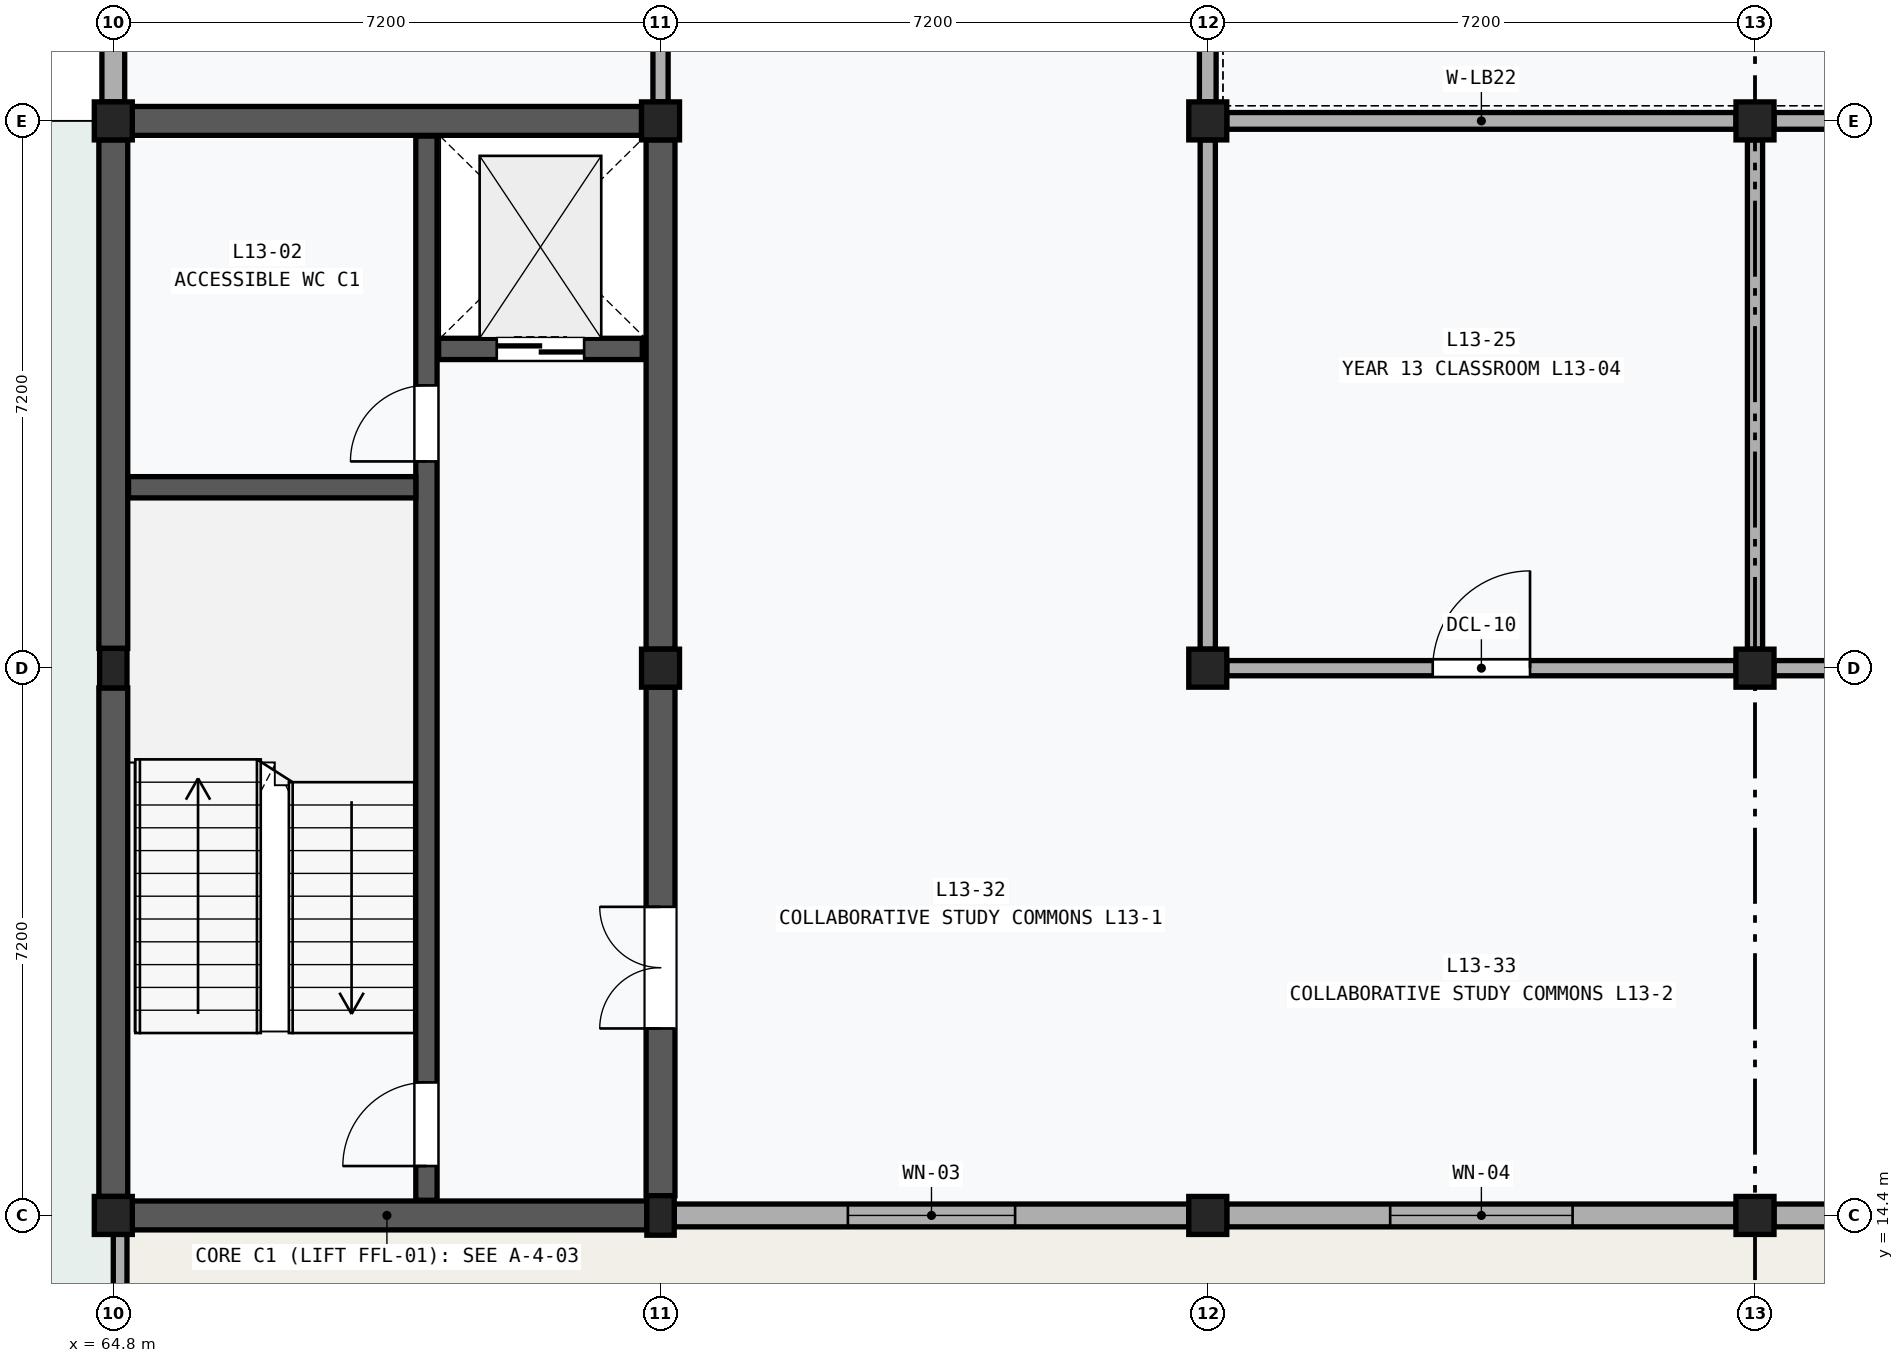
"""IFC4 building model, lengths in metres.
Left out: names, types, materials, properties, quantities, classifications, styles, units other than length and angle.
Written with IfcOpenShell. Run it as: python <this file> out.ifc"""

import sys

from ifc_helpers import new_model, si_unit, direction, frame, frame_2d, origin, origin_2d, place, context, subcontext, project, spatial, rectangle, extrude, element, fill, save


model = new_model("IFC4")
c1 = context("Model", 3, precision=1e-05, world=origin(), true_north=direction((0.0, 1.0)))
c2 = subcontext(c1, "Body", "Model", "MODEL_VIEW")
j1 = project(units=[si_unit("LENGTHUNIT", "METRE"), si_unit("PLANEANGLEUNIT", "RADIAN")], contexts=[c1])
p1 = place(None, origin())
s1 = spatial("IfcSite", under=j1, at=p1, CompositionType="ELEMENT")
p2 = place(p1, origin())
s2 = spatial("IfcBuilding", under=s1, at=p2, CompositionType="ELEMENT")
p3 = place(p2, frame((0.0, 0.0, 55.0)))
s3 = spatial("IfcBuildingStorey", under=s2, at=p3, CompositionType="ELEMENT", Elevation=55.0)
p4 = place(p3, frame((64.8, 14.4, 0.0), z_axis=(0.0, 0.0, 1.0), x_axis=(1.0, 0.0, 0.0)))
e1 = element("IfcColumn", 1, at=p4, inside=s3, PredefinedType="COLUMN", context=c2, shape_type="SweptSolid", body=[
    extrude(rectangle(XDim=0.5, YDim=0.5, at=origin_2d()), origin(), (0.0, 0.0, 1.0), 4.0),
])
p5 = place(p3, frame((64.8, 21.6, 0.0), z_axis=(0.0, 0.0, 1.0), x_axis=(1.0, 0.0, 0.0)))
e2 = element("IfcColumn", 2, at=p5, inside=s3, PredefinedType="PILASTER", context=c2, shape_type="SweptSolid", body=[
    extrude(rectangle(XDim=0.36, YDim=0.52, at=origin_2d()), origin(), (0.0, 0.0, 1.0), 4.0),
])
p6 = place(p3, frame((64.8, 28.8, 0.0), z_axis=(0.0, 0.0, 1.0), x_axis=(1.0, 0.0, 0.0)))
e3 = element("IfcColumn", 3, at=p6, inside=s3, PredefinedType="COLUMN", context=c2, shape_type="SweptSolid", body=[
    extrude(rectangle(XDim=0.5, YDim=0.5, at=origin_2d()), origin(), (0.0, 0.0, 1.0), 4.0),
])
p7 = place(p3, frame((72.0, 14.4, 0.0), z_axis=(0.0, 0.0, 1.0), x_axis=(1.0, 0.0, 0.0)))
e4 = element("IfcColumn", 4, at=p7, inside=s3, PredefinedType="PILASTER", context=c2, shape_type="SweptSolid", body=[
    extrude(rectangle(XDim=0.36, YDim=0.52, at=origin_2d()), origin(), (0.0, 0.0, 1.0), 4.0),
])
for number, where, z_axis, x_axis in (
    (5, (72.0, 21.6, 0.0), (0.0, 0.0, 1.0), (1.0, 0.0, 0.0)),
    (6, (72.0, 28.8, 0.0), (0.0, 0.0, 1.0), (1.0, 0.0, 0.0)),
    (7, (79.2, 14.4, 0.0), (0.0, 0.0, 1.0), (1.0, 0.0, 0.0)),
    (8, (79.2, 21.6, 0.0), (0.0, 0.0, 1.0), (1.0, 0.0, 0.0)),
    (9, (79.2, 28.8, 0.0), (0.0, 0.0, 1.0), (1.0, 0.0, 0.0)),
    (10, (86.4, 14.4, 0.0), (0.0, 0.0, 1.0), (1.0, 0.0, 0.0)),
    (11, (86.4, 21.6, 0.0), (0.0, 0.0, 1.0), (1.0, 0.0, 0.0)),
    (12, (86.4, 28.8, 0.0), (0.0, 0.0, 1.0), (1.0, 0.0, 0.0)),
):
    element("IfcColumn", number, at=place(p3, frame(where, z_axis=z_axis, x_axis=x_axis)), inside=s3, PredefinedType="COLUMN", context=c2, shape_type="SweptSolid", body=[
        extrude(rectangle(XDim=0.5, YDim=0.5, at=origin_2d()), origin(), (0.0, 0.0, 1.0), 4.0),
    ])
p8 = place(p3, frame((64.8, 29.05, 0.0), z_axis=(0.0, 0.0, 1.0), x_axis=(0.0, 1.0, 0.0)))
e13 = element("IfcWall", 13, at=p8, inside=s3, PredefinedType="SOLIDWALL", context=c2, shape_type="SweptSolid", body=[
    extrude(rectangle(XDim=6.7, YDim=0.3, at=frame_2d((3.35, 0.0))), origin(), (0.0, 0.0, 1.0), 3.17),
])
p9 = place(p3, frame((72.18, 14.4, 0.0), z_axis=(0.0, 0.0, 1.0), x_axis=(1.0, 0.0, 0.0)))
e14 = element("IfcWall", 14, at=p9, inside=s3, PredefinedType="SOLIDWALL", context=c2, shape_type="SweptSolid", body=[
    extrude(rectangle(XDim=6.77, YDim=0.3, at=frame_2d((3.385, 0.0))), origin(), (0.0, 0.0, 1.0), 3.17),
])
p10 = place(p9, frame((2.285, 0.0, 0.9)))
e15 = element("IfcOpeningElement", 15, at=p10, cuts=e14, PredefinedType="OPENING", context=c2, shape_type="SweptSolid", body=[
    extrude(rectangle(XDim=2.2, YDim=1.8, at=frame_2d((1.1, 0.9))), frame((0.0, 0.162, 0.0), z_axis=(0.0, -1.0, 0.0), x_axis=(1.0, 0.0, 0.0)), (0.0, 0.0, 1.0), 0.324),
])
p11 = place(p3, frame((79.45, 14.4, 0.0), z_axis=(0.0, 0.0, 1.0), x_axis=(1.0, 0.0, 0.0)))
e16 = element("IfcWall", 16, at=p11, inside=s3, PredefinedType="SOLIDWALL", context=c2, shape_type="SweptSolid", body=[
    extrude(rectangle(XDim=6.7, YDim=0.3, at=frame_2d((3.35, 0.0))), origin(), (0.0, 0.0, 1.0), 3.17),
])
p12 = place(p11, frame((2.15, 0.0, 0.9)))
e17 = element("IfcOpeningElement", 17, at=p12, cuts=e16, PredefinedType="OPENING", context=c2, shape_type="SweptSolid", body=[
    extrude(rectangle(XDim=2.4, YDim=1.8, at=frame_2d((1.2, 0.9))), frame((0.0, 0.162, 0.0), z_axis=(0.0, -1.0, 0.0), x_axis=(1.0, 0.0, 0.0)), (0.0, 0.0, 1.0), 0.324),
])
p13 = place(p3, frame((86.65, 14.4, 0.0), z_axis=(0.0, 0.0, 1.0), x_axis=(1.0, 0.0, 0.0)))
e18 = element("IfcWall", 18, at=p13, inside=s3, PredefinedType="SOLIDWALL", context=c2, shape_type="SweptSolid", body=[
    extrude(rectangle(XDim=6.7, YDim=0.3, at=frame_2d((3.35, 0.0))), origin(), (0.0, 0.0, 1.0), 3.17),
])
p14 = place(p13, frame((2.05, 0.0, 0.9)))
e19 = element("IfcOpeningElement", 19, at=p14, cuts=e18, PredefinedType="OPENING", context=c2, shape_type="SweptSolid", body=[
    extrude(rectangle(XDim=2.6, YDim=1.8, at=frame_2d((1.3, 0.9))), frame((0.0, 0.162, 0.0), z_axis=(0.0, -1.0, 0.0), x_axis=(1.0, 0.0, 0.0)), (0.0, 0.0, 1.0), 0.324),
])
p15 = place(p3, frame((64.89, 7.29, 0.0), z_axis=(0.0, 0.0, 1.0), x_axis=(0.0, 1.0, 0.0)))
e20 = element("IfcWall", 20, at=p15, inside=s3, PredefinedType="PARAPET", context=c2, shape_type="SweptSolid", body=[
    extrude(rectangle(XDim=7.02, YDim=0.18, at=frame_2d((3.51, 0.0))), origin(), (0.0, 0.0, 1.0), 0.95),
])
p16 = place(p3, frame((64.8, 14.65, 0.0), z_axis=(0.0, 0.0, 1.0), x_axis=(0.0, 1.0, 0.0)))
e21 = element("IfcWall", 21, at=p16, inside=s3, PredefinedType="SHEAR", context=c2, shape_type="SweptSolid", body=[
    extrude(rectangle(XDim=6.69, YDim=0.38, at=frame_2d((3.345, 0.0))), origin(), (0.0, 0.0, 1.0), 3.17),
])
p17 = place(p3, frame((64.8, 21.86, 0.0), z_axis=(0.0, 0.0, 1.0), x_axis=(0.0, 1.0, 0.0)))
e22 = element("IfcWall", 22, at=p17, inside=s3, PredefinedType="SHEAR", context=c2, shape_type="SweptSolid", body=[
    extrude(rectangle(XDim=6.69, YDim=0.38, at=frame_2d((3.345, 0.0))), origin(), (0.0, 0.0, 1.0), 3.17),
])
p18 = place(p3, frame((72.0, 14.66, 0.0), z_axis=(0.0, 0.0, 1.0), x_axis=(0.0, 1.0, 0.0)))
e23 = element("IfcWall", 23, at=p18, inside=s3, PredefinedType="SHEAR", context=c2, shape_type="SweptSolid", body=[
    extrude(rectangle(XDim=6.69, YDim=0.38, at=frame_2d((3.345, 0.0))), origin(), (0.0, 0.0, 1.0), 3.09),
])
p19 = place(p18, frame((2.2, 0.0, 0.0)))
e24 = element("IfcOpeningElement", 24, at=p19, cuts=e23, PredefinedType="OPENING", context=c2, shape_type="SweptSolid", body=[
    extrude(rectangle(XDim=1.6, YDim=2.2, at=frame_2d((0.8, 1.1))), frame((0.0, 0.202, 0.0), z_axis=(0.0, -1.0, 0.0), x_axis=(1.0, 0.0, 0.0)), (0.0, 0.0, 1.0), 0.404),
])
p20 = place(p3, frame((72.0, 21.85, 0.0), z_axis=(0.0, 0.0, 1.0), x_axis=(0.0, 1.0, 0.0)))
e25 = element("IfcWall", 25, at=p20, inside=s3, PredefinedType="SHEAR", context=c2, shape_type="SweptSolid", body=[
    extrude(rectangle(XDim=6.7, YDim=0.38, at=frame_2d((3.35, 0.0))), origin(), (0.0, 0.0, 1.0), 3.09),
])
p21 = place(p3, frame((65.05, 14.4, 0.0), z_axis=(0.0, 0.0, 1.0), x_axis=(1.0, 0.0, 0.0)))
e26 = element("IfcWall", 26, at=p21, inside=s3, PredefinedType="SHEAR", context=c2, shape_type="SweptSolid", body=[
    extrude(rectangle(XDim=6.77, YDim=0.38, at=frame_2d((3.385, 0.0))), origin(), (0.0, 0.0, 1.0), 3.17),
])
p22 = place(p3, frame((65.05, 28.8, 0.0), z_axis=(0.0, 0.0, 1.0), x_axis=(1.0, 0.0, 0.0)))
e27 = element("IfcWall", 27, at=p22, inside=s3, PredefinedType="SHEAR", context=c2, shape_type="SweptSolid", body=[
    extrude(rectangle(XDim=6.7, YDim=0.38, at=frame_2d((3.35, 0.0))), origin(), (0.0, 0.0, 1.0), 3.09),
])
p23 = place(p3, frame((68.92, 14.6, 0.0), z_axis=(0.0, 0.0, 1.0), x_axis=(0.0, 1.0, 0.0)))
e28 = element("IfcWall", 28, at=p23, inside=s3, PredefinedType="SHEAR", context=c2, shape_type="SweptSolid", body=[
    extrude(rectangle(XDim=14.0, YDim=0.28, at=frame_2d((7.0, 0.0))), origin(), (0.0, 0.0, 1.0), 3.77),
])
p24 = place(p23, frame((0.45, 0.0, 0.0)))
e29 = element("IfcOpeningElement", 29, at=p24, cuts=e28, PredefinedType="OPENING", context=c2, shape_type="SweptSolid", body=[
    extrude(rectangle(XDim=1.1, YDim=2.15, at=frame_2d((0.55, 1.075))), frame((0.0, 0.152, 0.0), z_axis=(0.0, -1.0, 0.0), x_axis=(1.0, 0.0, 0.0)), (0.0, 0.0, 1.0), 0.304),
])
p25 = place(p23, frame((9.72, 0.0, 0.0)))
e30 = element("IfcOpeningElement", 30, at=p25, cuts=e28, PredefinedType="OPENING", context=c2, shape_type="SweptSolid", body=[
    extrude(rectangle(XDim=1.0, YDim=2.15, at=frame_2d((0.5, 1.075))), frame((0.0, 0.152, 0.0), z_axis=(0.0, -1.0, 0.0), x_axis=(1.0, 0.0, 0.0)), (0.0, 0.0, 1.0), 0.304),
])
p26 = place(p3, frame((65.0, 23.98, 0.0), z_axis=(0.0, 0.0, 1.0), x_axis=(1.0, 0.0, 0.0)))
e31 = element("IfcWall", 31, at=p26, inside=s3, PredefinedType="SHEAR", context=c2, shape_type="SweptSolid", body=[
    extrude(rectangle(XDim=3.78, YDim=0.28, at=frame_2d((1.89, 0.0))), origin(), (0.0, 0.0, 1.0), 3.77),
])
p27 = place(p3, frame((69.08, 25.8, 0.0), z_axis=(0.0, 0.0, 1.0), x_axis=(1.0, 0.0, 0.0)))
e32 = element("IfcWall", 32, at=p27, inside=s3, PredefinedType="SHEAR", context=c2, shape_type="SweptSolid", body=[
    extrude(rectangle(XDim=2.68, YDim=0.28, at=frame_2d((1.34, 0.0))), origin(), (0.0, 0.0, 1.0), 3.77),
])
p28 = place(p27, frame((0.765, 0.0, 0.0)))
e33 = element("IfcOpeningElement", 33, at=p28, cuts=e32, PredefinedType="OPENING", context=c2, shape_type="SweptSolid", body=[
    extrude(rectangle(XDim=1.15, YDim=2.2, at=frame_2d((0.575, 1.1))), frame((0.0, 0.152, 0.0), z_axis=(0.0, -1.0, 0.0), x_axis=(1.0, 0.0, 0.0)), (0.0, 0.0, 1.0), 0.304),
])
p29 = place(p3, frame((79.45, 28.8, 0.0), z_axis=(0.0, 0.0, 1.0), x_axis=(1.0, 0.0, 0.0)))
e34 = element("IfcWall", 34, at=p29, inside=s3, PredefinedType="PARTITIONING", context=c2, shape_type="SweptSolid", body=[
    extrude(rectangle(XDim=6.7, YDim=0.22, at=frame_2d((3.35, 0.0))), origin(), (0.0, 0.0, 1.0), 3.09),
])
p30 = place(p3, frame((79.2, 29.05, 0.0), z_axis=(0.0, 0.0, 1.0), x_axis=(0.0, 1.0, 0.0)))
e35 = element("IfcWall", 35, at=p30, inside=s3, PredefinedType="PARTITIONING", context=c2, shape_type="SweptSolid", body=[
    extrude(rectangle(XDim=6.7, YDim=0.22, at=frame_2d((3.35, 0.0))), origin(), (0.0, 0.0, 1.0), 3.09),
])
p31 = place(p30, frame((2.81, 0.0, 0.0)))
e36 = element("IfcOpeningElement", 36, at=p31, cuts=e35, PredefinedType="OPENING", context=c2, shape_type="SweptSolid", body=[
    extrude(rectangle(XDim=1.08, YDim=2.18, at=frame_2d((0.54, 1.09))), frame((0.0, 0.122, 0.0), z_axis=(0.0, -1.0, 0.0), x_axis=(1.0, 0.0, 0.0)), (0.0, 0.0, 1.0), 0.244),
])
p32 = place(p3, frame((86.65, 28.8, 0.0), z_axis=(0.0, 0.0, 1.0), x_axis=(1.0, 0.0, 0.0)))
e37 = element("IfcWall", 37, at=p32, inside=s3, PredefinedType="PARTITIONING", context=c2, shape_type="SweptSolid", body=[
    extrude(rectangle(XDim=6.7, YDim=0.22, at=frame_2d((3.35, 0.0))), origin(), (0.0, 0.0, 1.0), 3.09),
])
p33 = place(p3, frame((72.0, 29.05, 0.0), z_axis=(0.0, 0.0, 1.0), x_axis=(0.0, 1.0, 0.0)))
e38 = element("IfcWall", 38, at=p33, inside=s3, PredefinedType="PARTITIONING", context=c2, shape_type="SweptSolid", body=[
    extrude(rectangle(XDim=6.7, YDim=0.2, at=frame_2d((3.35, 0.0))), origin(), (0.0, 0.0, 1.0), 3.09),
])
p34 = place(p33, frame((2.77, 0.0, 0.0)))
e39 = element("IfcOpeningElement", 39, at=p34, cuts=e38, PredefinedType="OPENING", context=c2, shape_type="SweptSolid", body=[
    extrude(rectangle(XDim=1.16, YDim=2.22, at=frame_2d((0.58, 1.11))), frame((0.0, 0.112, 0.0), z_axis=(0.0, -1.0, 0.0), x_axis=(1.0, 0.0, 0.0)), (0.0, 0.0, 1.0), 0.224),
])
p35 = place(p3, frame((79.45, 21.6, 0.0), z_axis=(0.0, 0.0, 1.0), x_axis=(1.0, 0.0, 0.0)))
e40 = element("IfcWall", 40, at=p35, inside=s3, PredefinedType="PARTITIONING", context=c2, shape_type="SweptSolid", body=[
    extrude(rectangle(XDim=6.7, YDim=0.2, at=frame_2d((3.35, 0.0))), origin(), (0.0, 0.0, 1.0), 3.09),
])
p36 = place(p35, frame((2.71, 0.0, 0.0)))
e41 = element("IfcOpeningElement", 41, at=p36, cuts=e40, PredefinedType="OPENING", context=c2, shape_type="SweptSolid", body=[
    extrude(rectangle(XDim=1.28, YDim=2.28, at=frame_2d((0.64, 1.14))), frame((0.0, 0.112, 0.0), z_axis=(0.0, -1.0, 0.0), x_axis=(1.0, 0.0, 0.0)), (0.0, 0.0, 1.0), 0.224),
])
for number, where, z_axis, x_axis in (
    (42, (79.2, 21.85, 0.0), (0.0, 0.0, 1.0), (0.0, 1.0, 0.0)),
    (43, (86.4, 21.85, 0.0), (0.0, 0.0, 1.0), (0.0, 1.0, 0.0)),
):
    element("IfcWall", number, at=place(p3, frame(where, z_axis=z_axis, x_axis=x_axis)), inside=s3, PredefinedType="PARTITIONING", context=c2, shape_type="SweptSolid", body=[
        extrude(rectangle(XDim=6.7, YDim=0.2, at=frame_2d((3.35, 0.0))), origin(), (0.0, 0.0, 1.0), 3.09),
    ])
p37 = place(p3, frame((86.65, 21.6, 0.0), z_axis=(0.0, 0.0, 1.0), x_axis=(1.0, 0.0, 0.0)))
e44 = element("IfcWall", 44, at=p37, inside=s3, PredefinedType="PARTITIONING", context=c2, shape_type="SweptSolid", body=[
    extrude(rectangle(XDim=6.7, YDim=0.2, at=frame_2d((3.35, 0.0))), origin(), (0.0, 0.0, 1.0), 3.09),
])
p38 = place(p37, frame((2.83, 0.0, 0.0)))
e45 = element("IfcOpeningElement", 45, at=p38, cuts=e44, PredefinedType="OPENING", context=c2, shape_type="SweptSolid", body=[
    extrude(rectangle(XDim=1.04, YDim=2.14, at=frame_2d((0.52, 1.07))), frame((0.0, 0.112, 0.0), z_axis=(0.0, -1.0, 0.0), x_axis=(1.0, 0.0, 0.0)), (0.0, 0.0, 1.0), 0.224),
])
p39 = place(p10, origin())
e46 = element("IfcWindow", 46, at=p39, inside=s3, PartitioningType="SINGLE_PANEL", PredefinedType="WINDOW", context=c2, shape_type="SweptSolid", body=[
    extrude(rectangle(XDim=2.2, YDim=1.8, at=frame_2d((1.1, 0.9))), frame((0.0, 0.03, 0.0), z_axis=(0.0, -1.0, 0.0), x_axis=(1.0, 0.0, 0.0)), (0.0, 0.0, 1.0), 0.06),
])
fill(e15, e46)
p40 = place(p12, origin())
e47 = element("IfcWindow", 47, at=p40, inside=s3, PartitioningType="SINGLE_PANEL", PredefinedType="WINDOW", context=c2, shape_type="SweptSolid", body=[
    extrude(rectangle(XDim=2.4, YDim=1.8, at=frame_2d((1.2, 0.9))), frame((0.0, 0.03, 0.0), z_axis=(0.0, -1.0, 0.0), x_axis=(1.0, 0.0, 0.0)), (0.0, 0.0, 1.0), 0.06),
])
fill(e17, e47)
p41 = place(p19, origin())
e48 = element("IfcDoor", 48, at=p41, inside=s3, OperationType="DOUBLE_DOOR_SINGLE_SWING", PredefinedType="DOOR", context=c2, shape_type="SweptSolid", body=[
    extrude(rectangle(XDim=1.6, YDim=2.2, at=frame_2d((0.8, 1.1))), frame((0.0, 0.025, 0.0), z_axis=(0.0, -1.0, 0.0), x_axis=(1.0, 0.0, 0.0)), (0.0, 0.0, 1.0), 0.05),
])
fill(e24, e48)
p42 = place(p24, origin())
e49 = element("IfcDoor", 49, at=p42, inside=s3, OperationType="SINGLE_SWING_LEFT", PredefinedType="DOOR", context=c2, shape_type="SweptSolid", body=[
    extrude(rectangle(XDim=1.1, YDim=2.15, at=frame_2d((0.55, 1.075))), frame((0.0, 0.025, 0.0), z_axis=(0.0, -1.0, 0.0), x_axis=(1.0, 0.0, 0.0)), (0.0, 0.0, 1.0), 0.05),
])
fill(e29, e49)
p43 = place(p25, origin())
e50 = element("IfcDoor", 50, at=p43, inside=s3, OperationType="SINGLE_SWING_LEFT", PredefinedType="DOOR", context=c2, shape_type="SweptSolid", body=[
    extrude(rectangle(XDim=1.0, YDim=2.15, at=frame_2d((0.5, 1.075))), frame((0.0, 0.025, 0.0), z_axis=(0.0, -1.0, 0.0), x_axis=(1.0, 0.0, 0.0)), (0.0, 0.0, 1.0), 0.05),
])
fill(e30, e50)
p44 = place(p28, frame((1.15, 0.0, 0.0), z_axis=(0.0, 0.0, 1.0), x_axis=(-1.0, 0.0, 0.0)))
e51 = element("IfcDoor", 51, at=p44, inside=s3, OperationType="DOUBLE_DOOR_SLIDING", PredefinedType="DOOR", context=c2, shape_type="SweptSolid", body=[
    extrude(rectangle(XDim=1.15, YDim=2.2, at=frame_2d((0.575, 1.1))), frame((0.0, 0.025, 0.0), z_axis=(0.0, -1.0, 0.0), x_axis=(1.0, 0.0, 0.0)), (0.0, 0.0, 1.0), 0.05),
])
fill(e33, e51)
p45 = place(p36, origin())
e52 = element("IfcDoor", 52, at=p45, inside=s3, OperationType="SINGLE_SWING_RIGHT", PredefinedType="DOOR", context=c2, shape_type="SweptSolid", body=[
    extrude(rectangle(XDim=1.28, YDim=2.28, at=frame_2d((0.64, 1.14))), frame((0.0, 0.025, 0.0), z_axis=(0.0, -1.0, 0.0), x_axis=(1.0, 0.0, 0.0)), (0.0, 0.0, 1.0), 0.05),
])
fill(e41, e52)
save(model, sys.argv[1])
